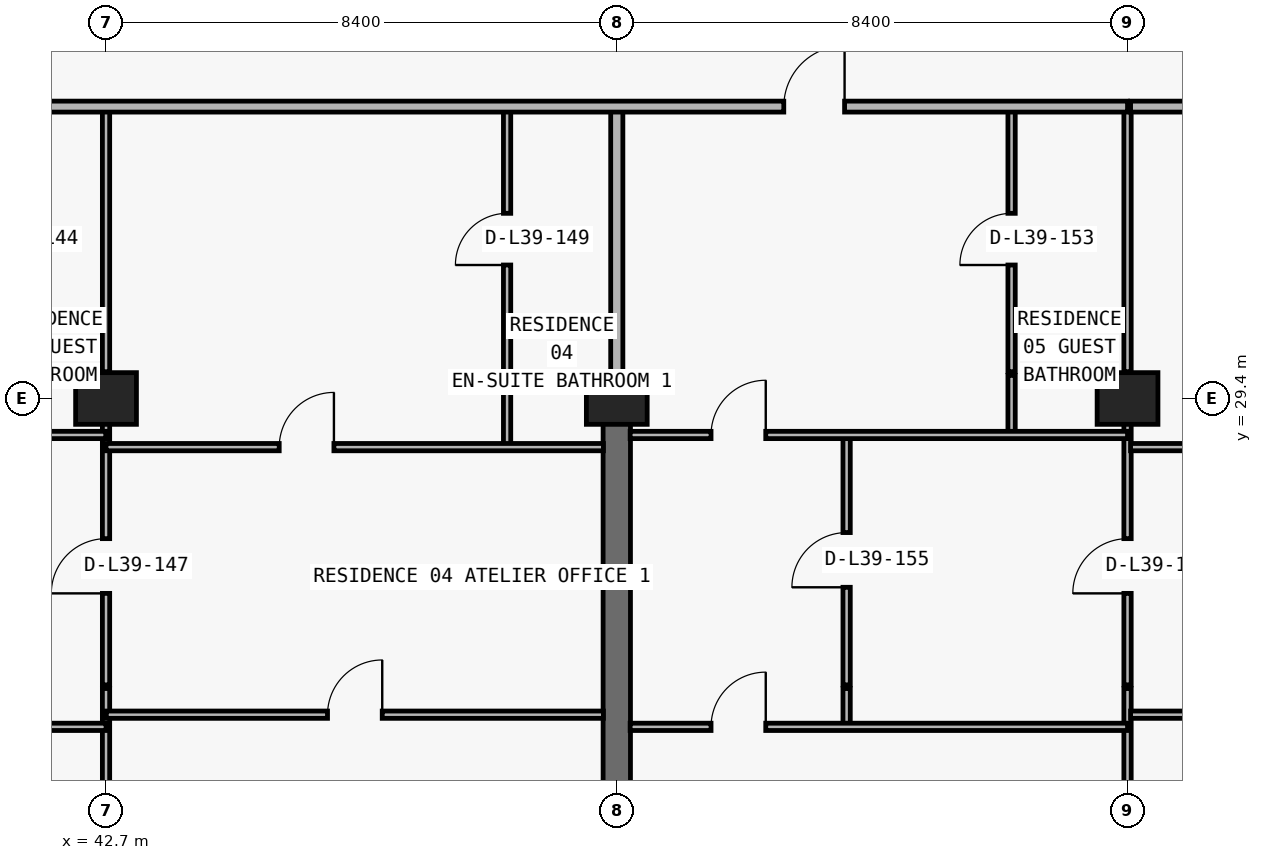
"""IFC4 building model, lengths in metres.
Left out: names, types, materials, properties, quantities, classifications, styles, units other than length and angle.
Written with IfcOpenShell. Run it as: python <this file> out.ifc"""

import sys

from ifc_helpers import new_model, si_unit, direction, frame, frame_2d, origin, origin_2d, place, context, subcontext, project, spatial, rectangle, extrude, element, fill, save


model = new_model("IFC4")
c1 = context("Model", 3, precision=1e-05, world=origin(), true_north=direction((0.0, 1.0)))
c2 = subcontext(c1, "Body", "Model", "MODEL_VIEW")
j1 = project(units=[si_unit("LENGTHUNIT", "METRE"), si_unit("PLANEANGLEUNIT", "RADIAN")], contexts=[c1])
p1 = place(None, origin())
s1 = spatial("IfcSite", under=j1, at=p1, CompositionType="ELEMENT")
p2 = place(p1, origin())
s2 = spatial("IfcBuilding", under=s1, at=p2, CompositionType="ELEMENT")
p3 = place(p2, frame((0.0, 0.0, 142.2)))
s3 = spatial("IfcBuildingStorey", under=s2, at=p3, CompositionType="ELEMENT", Elevation=142.2)
for number, where, z_axis, x_axis in (
    (1, (42.7, 29.4, 0.0), (0.0, 0.0, 1.0), (1.0, 0.0, 0.0)),
    (2, (51.1, 29.4, 0.0), (0.0, 0.0, 1.0), (1.0, 0.0, 0.0)),
    (3, (59.5, 29.4, 0.0), (0.0, 0.0, 1.0), (1.0, 0.0, 0.0)),
):
    element("IfcColumn", number, at=place(p3, frame(where, z_axis=z_axis, x_axis=x_axis)), inside=s3, PredefinedType="COLUMN", context=c2, shape_type="SweptSolid", body=[
        extrude(rectangle(XDim=1.0, YDim=0.85, at=origin_2d()), origin(), (0.0, 0.0, 1.0), 3.05),
    ])
p4 = place(p3, frame((51.1, 20.8, 0.0), z_axis=(0.0, 0.0, 1.0), x_axis=(0.0, 1.0, 0.0)))
e4 = element("IfcWall", 4, at=p4, inside=s3, PredefinedType="SHEAR", context=c2, shape_type="SweptSolid", body=[
    extrude(rectangle(XDim=8.6, YDim=0.45, at=frame_2d((4.3, 0.0))), origin(), (0.0, 0.0, 1.0), 3.05),
])
p5 = place(p3, frame((42.7, 8.84, 0.0), z_axis=(0.0, 0.0, 1.0), x_axis=(0.0, 1.0, 0.0)))
e5 = element("IfcWall", 5, at=p5, inside=s3, PredefinedType="PARTITIONING", context=c2, shape_type="SweptSolid", body=[
    extrude(rectangle(XDim=15.79, YDim=0.12, at=frame_2d((7.895, 0.0))), origin(), (0.0, 0.0, 1.0), 2.174),
])
p6 = place(p3, frame((42.7, 24.69, 0.0), z_axis=(0.0, 0.0, 1.0), x_axis=(0.0, 1.0, 0.0)))
e6 = element("IfcWall", 6, at=p6, inside=s3, PredefinedType="PARTITIONING", context=c2, shape_type="SweptSolid", body=[
    extrude(rectangle(XDim=5.09, YDim=0.12, at=frame_2d((2.545, 0.0))), origin(), (0.0, 0.0, 1.0), 2.174),
])
p7 = place(p6, frame((1.505, 0.0, 0.0)))
e7 = element("IfcOpeningElement", 7, at=p7, cuts=e6, PredefinedType="OPENING", context=c2, shape_type="SweptSolid", body=[
    extrude(rectangle(XDim=0.9, YDim=2.124, at=frame_2d((0.45, 1.062))), frame((0.0, 0.07, 0.0), z_axis=(0.0, -1.0, 0.0), x_axis=(1.0, 0.0, 0.0)), (0.0, 0.0, 1.0), 0.14),
])
p8 = place(p3, frame((42.7, 29.84, 0.0), z_axis=(0.0, 0.0, 1.0), x_axis=(0.0, 1.0, 0.0)))
e8 = element("IfcWall", 8, at=p8, inside=s3, PredefinedType="PARTITIONING", context=c2, shape_type="SweptSolid", body=[
    extrude(rectangle(XDim=4.36, YDim=0.12, at=frame_2d((2.18, 0.0))), origin(), (0.0, 0.0, 1.0), 2.174),
])
p9 = place(p3, frame((49.296, 28.6, 0.0), z_axis=(0.0, 0.0, 1.0), x_axis=(0.0, 1.0, 0.0)))
e9 = element("IfcWall", 9, at=p9, inside=s3, PredefinedType="PARTITIONING", context=c2, shape_type="SweptSolid", body=[
    extrude(rectangle(XDim=1.18, YDim=0.12, at=frame_2d((0.59, 0.0))), origin(), (0.0, 0.0, 1.0), 3.05),
])
p10 = place(p3, frame((49.296, 29.84, 0.0), z_axis=(0.0, 0.0, 1.0), x_axis=(0.0, 1.0, 0.0)))
e10 = element("IfcWall", 10, at=p10, inside=s3, PredefinedType="PARTITIONING", context=c2, shape_type="SweptSolid", body=[
    extrude(rectangle(XDim=4.36, YDim=0.12, at=frame_2d((2.18, 0.0))), origin(), (0.0, 0.0, 1.0), 3.05),
])
p11 = place(p10, frame((1.755, 0.0, 0.0)))
e11 = element("IfcOpeningElement", 11, at=p11, cuts=e10, PredefinedType="OPENING", context=c2, shape_type="SweptSolid", body=[
    extrude(rectangle(XDim=0.85, YDim=2.1, at=frame_2d((0.425, 1.05))), frame((0.0, 0.07, 0.0), z_axis=(0.0, -1.0, 0.0), x_axis=(1.0, 0.0, 0.0)), (0.0, 0.0, 1.0), 0.14),
])
p12 = place(p3, frame((51.1, 29.405, 0.0), z_axis=(0.0, 0.0, 1.0), x_axis=(0.0, 1.0, 0.0)))
e12 = element("IfcWall", 12, at=p12, inside=s3, PredefinedType="PARTITIONING", context=c2, shape_type="SweptSolid", body=[
    extrude(rectangle(XDim=0.375, YDim=0.2, at=frame_2d((0.188, 0.0))), origin(), (0.0, 0.0, 1.0), 3.05),
])
p13 = place(p3, frame((51.1, 29.84, 0.0), z_axis=(0.0, 0.0, 1.0), x_axis=(0.0, 1.0, 0.0)))
e13 = element("IfcWall", 13, at=p13, inside=s3, PredefinedType="PARTITIONING", context=c2, shape_type="SweptSolid", body=[
    extrude(rectangle(XDim=4.36, YDim=0.2, at=frame_2d((2.18, 0.0))), origin(), (0.0, 0.0, 1.0), 2.335),
])
p14 = place(p3, frame((54.88, 24.0, 0.0), z_axis=(0.0, 0.0, 1.0), x_axis=(0.0, 1.0, 0.0)))
e14 = element("IfcWall", 14, at=p14, inside=s3, PredefinedType="PARTITIONING", context=c2, shape_type="SweptSolid", body=[
    extrude(rectangle(XDim=0.63, YDim=0.12, at=frame_2d((0.315, 0.0))), origin(), (0.0, 0.0, 1.0), 3.05),
])
p15 = place(p3, frame((54.88, 24.69, 0.0), z_axis=(0.0, 0.0, 1.0), x_axis=(0.0, 1.0, 0.0)))
e15 = element("IfcWall", 15, at=p15, inside=s3, PredefinedType="PARTITIONING", context=c2, shape_type="SweptSolid", body=[
    extrude(rectangle(XDim=4.11, YDim=0.12, at=frame_2d((2.055, 0.0))), origin(), (0.0, 0.0, 1.0), 3.05),
])
p16 = place(p15, frame((1.605, 0.0, 0.0)))
e16 = element("IfcOpeningElement", 16, at=p16, cuts=e15, PredefinedType="OPENING", context=c2, shape_type="SweptSolid", body=[
    extrude(rectangle(XDim=0.9, YDim=2.15, at=frame_2d((0.45, 1.075))), frame((0.0, 0.07, 0.0), z_axis=(0.0, -1.0, 0.0), x_axis=(1.0, 0.0, 0.0)), (0.0, 0.0, 1.0), 0.14),
])
p17 = place(p3, frame((57.593, 28.8, 0.0), z_axis=(0.0, 0.0, 1.0), x_axis=(0.0, 1.0, 0.0)))
e17 = element("IfcWall", 17, at=p17, inside=s3, PredefinedType="PARTITIONING", context=c2, shape_type="SweptSolid", body=[
    extrude(rectangle(XDim=0.98, YDim=0.12, at=frame_2d((0.49, 0.0))), origin(), (0.0, 0.0, 1.0), 3.05),
])
p18 = place(p3, frame((57.593, 29.84, 0.0), z_axis=(0.0, 0.0, 1.0), x_axis=(0.0, 1.0, 0.0)))
e18 = element("IfcWall", 18, at=p18, inside=s3, PredefinedType="PARTITIONING", context=c2, shape_type="SweptSolid", body=[
    extrude(rectangle(XDim=4.36, YDim=0.12, at=frame_2d((2.18, 0.0))), origin(), (0.0, 0.0, 1.0), 3.05),
])
p19 = place(p18, frame((1.755, 0.0, 0.0)))
e19 = element("IfcOpeningElement", 19, at=p19, cuts=e18, PredefinedType="OPENING", context=c2, shape_type="SweptSolid", body=[
    extrude(rectangle(XDim=0.85, YDim=2.1, at=frame_2d((0.425, 1.05))), frame((0.0, 0.07, 0.0), z_axis=(0.0, -1.0, 0.0), x_axis=(1.0, 0.0, 0.0)), (0.0, 0.0, 1.0), 0.14),
])
p20 = place(p3, frame((59.5, 8.84, 0.0), z_axis=(0.0, 0.0, 1.0), x_axis=(0.0, 1.0, 0.0)))
e20 = element("IfcWall", 20, at=p20, inside=s3, PredefinedType="PARTITIONING", context=c2, shape_type="SweptSolid", body=[
    extrude(rectangle(XDim=15.79, YDim=0.12, at=frame_2d((7.895, 0.0))), origin(), (0.0, 0.0, 1.0), 2.174),
])
p21 = place(p3, frame((59.5, 24.69, 0.0), z_axis=(0.0, 0.0, 1.0), x_axis=(0.0, 1.0, 0.0)))
e21 = element("IfcWall", 21, at=p21, inside=s3, PredefinedType="PARTITIONING", context=c2, shape_type="SweptSolid", body=[
    extrude(rectangle(XDim=5.09, YDim=0.12, at=frame_2d((2.545, 0.0))), origin(), (0.0, 0.0, 1.0), 2.174),
])
p22 = place(p21, frame((1.505, 0.0, 0.0)))
e22 = element("IfcOpeningElement", 22, at=p22, cuts=e21, PredefinedType="OPENING", context=c2, shape_type="SweptSolid", body=[
    extrude(rectangle(XDim=0.9, YDim=2.124, at=frame_2d((0.45, 1.062))), frame((0.0, 0.07, 0.0), z_axis=(0.0, -1.0, 0.0), x_axis=(1.0, 0.0, 0.0)), (0.0, 0.0, 1.0), 0.14),
])
p23 = place(p3, frame((59.5, 29.84, 0.0), z_axis=(0.0, 0.0, 1.0), x_axis=(0.0, 1.0, 0.0)))
e23 = element("IfcWall", 23, at=p23, inside=s3, PredefinedType="PARTITIONING", context=c2, shape_type="SweptSolid", body=[
    extrude(rectangle(XDim=4.36, YDim=0.12, at=frame_2d((2.18, 0.0))), origin(), (0.0, 0.0, 1.0), 2.174),
])
p24 = place(p3, frame((35.1, 24.0, 0.0), z_axis=(0.0, 0.0, 1.0), x_axis=(1.0, 0.0, 0.0)))
e24 = element("IfcWall", 24, at=p24, inside=s3, PredefinedType="PARTITIONING", context=c2, shape_type="SweptSolid", body=[
    extrude(rectangle(XDim=7.6, YDim=0.12, at=frame_2d((3.8, 0.0))), origin(), (0.0, 0.0, 1.0), 3.05),
])
p25 = place(p24, frame((3.35, 0.0, 0.0)))
e25 = element("IfcOpeningElement", 25, at=p25, cuts=e24, PredefinedType="OPENING", context=c2, shape_type="SweptSolid", body=[
    extrude(rectangle(XDim=0.9, YDim=2.15, at=frame_2d((0.45, 1.075))), frame((0.0, 0.07, 0.0), z_axis=(0.0, -1.0, 0.0), x_axis=(1.0, 0.0, 0.0)), (0.0, 0.0, 1.0), 0.14),
])
p26 = place(p3, frame((51.32, 24.0, 0.0), z_axis=(0.0, 0.0, 1.0), x_axis=(1.0, 0.0, 0.0)))
e26 = element("IfcWall", 26, at=p26, inside=s3, PredefinedType="PARTITIONING", context=c2, shape_type="SweptSolid", body=[
    extrude(rectangle(XDim=8.18, YDim=0.12, at=frame_2d((4.09, 0.0))), origin(), (0.0, 0.0, 1.0), 3.05),
])
p27 = place(p26, frame((1.33, 0.0, 0.0)))
e27 = element("IfcOpeningElement", 27, at=p27, cuts=e26, PredefinedType="OPENING", context=c2, shape_type="SweptSolid", body=[
    extrude(rectangle(XDim=0.9, YDim=2.15, at=frame_2d((0.45, 1.075))), frame((0.0, 0.07, 0.0), z_axis=(0.0, -1.0, 0.0), x_axis=(1.0, 0.0, 0.0)), (0.0, 0.0, 1.0), 0.14),
])
p28 = place(p3, frame((42.705, 24.2, 0.0), z_axis=(0.0, 0.0, 1.0), x_axis=(1.0, 0.0, 0.0)))
e28 = element("IfcWall", 28, at=p28, inside=s3, PredefinedType="PARTITIONING", context=c2, shape_type="SweptSolid", body=[
    extrude(rectangle(XDim=8.175, YDim=0.12, at=frame_2d((4.087, 0.0))), origin(), (0.0, 0.0, 1.0), 3.05),
])
p29 = place(p28, frame((3.637, 0.0, 0.0)))
e29 = element("IfcOpeningElement", 29, at=p29, cuts=e28, PredefinedType="OPENING", context=c2, shape_type="SweptSolid", body=[
    extrude(rectangle(XDim=0.9, YDim=2.15, at=frame_2d((0.45, 1.075))), frame((0.0, 0.07, 0.0), z_axis=(0.0, -1.0, 0.0), x_axis=(1.0, 0.0, 0.0)), (0.0, 0.0, 1.0), 0.14),
])
p30 = place(p3, frame((59.55, 24.2, 0.0), z_axis=(0.0, 0.0, 1.0), x_axis=(1.0, 0.0, 0.0)))
e30 = element("IfcWall", 30, at=p30, inside=s3, PredefinedType="PARTITIONING", context=c2, shape_type="SweptSolid", body=[
    extrude(rectangle(XDim=8.35, YDim=0.12, at=frame_2d((4.175, 0.0))), origin(), (0.0, 0.0, 1.0), 3.05),
])
p31 = place(p30, frame((3.725, 0.0, 0.0)))
e31 = element("IfcOpeningElement", 31, at=p31, cuts=e30, PredefinedType="OPENING", context=c2, shape_type="SweptSolid", body=[
    extrude(rectangle(XDim=0.9, YDim=2.15, at=frame_2d((0.45, 1.075))), frame((0.0, 0.07, 0.0), z_axis=(0.0, -1.0, 0.0), x_axis=(1.0, 0.0, 0.0)), (0.0, 0.0, 1.0), 0.14),
])
p32 = place(p3, frame((42.7, 28.6, 0.0), z_axis=(0.0, 0.0, 1.0), x_axis=(1.0, 0.0, 0.0)))
e32 = element("IfcWall", 32, at=p32, inside=s3, PredefinedType="PARTITIONING", context=c2, shape_type="SweptSolid", body=[
    extrude(rectangle(XDim=8.18, YDim=0.12, at=frame_2d((4.09, 0.0))), origin(), (0.0, 0.0, 1.0), 3.05),
])
p33 = place(p32, frame((2.848, 0.0, 0.0)))
e33 = element("IfcOpeningElement", 33, at=p33, cuts=e32, PredefinedType="OPENING", context=c2, shape_type="SweptSolid", body=[
    extrude(rectangle(XDim=0.9, YDim=2.15, at=frame_2d((0.45, 1.075))), frame((0.0, 0.07, 0.0), z_axis=(0.0, -1.0, 0.0), x_axis=(1.0, 0.0, 0.0)), (0.0, 0.0, 1.0), 0.14),
])
p34 = place(p3, frame((59.55, 28.6, 0.0), z_axis=(0.0, 0.0, 1.0), x_axis=(1.0, 0.0, 0.0)))
e34 = element("IfcWall", 34, at=p34, inside=s3, PredefinedType="PARTITIONING", context=c2, shape_type="SweptSolid", body=[
    extrude(rectangle(XDim=8.35, YDim=0.12, at=frame_2d((4.175, 0.0))), origin(), (0.0, 0.0, 1.0), 3.05),
])
p35 = place(p34, frame((2.868, 0.0, 0.0)))
e35 = element("IfcOpeningElement", 35, at=p35, cuts=e34, PredefinedType="OPENING", context=c2, shape_type="SweptSolid", body=[
    extrude(rectangle(XDim=0.9, YDim=2.15, at=frame_2d((0.45, 1.075))), frame((0.0, 0.07, 0.0), z_axis=(0.0, -1.0, 0.0), x_axis=(1.0, 0.0, 0.0)), (0.0, 0.0, 1.0), 0.14),
])
p36 = place(p3, frame((35.1, 28.8, 0.0), z_axis=(0.0, 0.0, 1.0), x_axis=(1.0, 0.0, 0.0)))
e36 = element("IfcWall", 36, at=p36, inside=s3, PredefinedType="PARTITIONING", context=c2, shape_type="SweptSolid", body=[
    extrude(rectangle(XDim=7.595, YDim=0.12, at=frame_2d((3.797, 0.0))), origin(), (0.0, 0.0, 1.0), 3.05),
])
p37 = place(p36, frame((2.442, 0.0, 0.0)))
e37 = element("IfcOpeningElement", 37, at=p37, cuts=e36, PredefinedType="OPENING", context=c2, shape_type="SweptSolid", body=[
    extrude(rectangle(XDim=0.9, YDim=2.15, at=frame_2d((0.45, 1.075))), frame((0.0, 0.07, 0.0), z_axis=(0.0, -1.0, 0.0), x_axis=(1.0, 0.0, 0.0)), (0.0, 0.0, 1.0), 0.14),
])
p38 = place(p3, frame((51.32, 28.8, 0.0), z_axis=(0.0, 0.0, 1.0), x_axis=(1.0, 0.0, 0.0)))
e38 = element("IfcWall", 38, at=p38, inside=s3, PredefinedType="PARTITIONING", context=c2, shape_type="SweptSolid", body=[
    extrude(rectangle(XDim=8.18, YDim=0.12, at=frame_2d((4.09, 0.0))), origin(), (0.0, 0.0, 1.0), 3.05),
])
p39 = place(p38, frame((1.33, 0.0, 0.0)))
e39 = element("IfcOpeningElement", 39, at=p39, cuts=e38, PredefinedType="OPENING", context=c2, shape_type="SweptSolid", body=[
    extrude(rectangle(XDim=0.9, YDim=2.15, at=frame_2d((0.45, 1.075))), frame((0.0, 0.07, 0.0), z_axis=(0.0, -1.0, 0.0), x_axis=(1.0, 0.0, 0.0)), (0.0, 0.0, 1.0), 0.14),
])
p40 = place(p3, frame((18.3, 34.2, 0.0), z_axis=(0.0, 0.0, 1.0), x_axis=(1.0, 0.0, 0.0)))
e40 = element("IfcWall", 40, at=p40, inside=s3, PredefinedType="PARTITIONING", context=c2, shape_type="SweptSolid", body=[
    extrude(rectangle(XDim=41.2, YDim=0.18, at=frame_2d((20.6, 0.0))), origin(), (0.0, 0.0, 1.0), 3.05),
])
p41 = place(p40, frame((2.683, 0.0, 0.0)))
e41 = element("IfcOpeningElement", 41, at=p41, cuts=e40, PredefinedType="OPENING", context=c2, shape_type="SweptSolid", body=[
    extrude(rectangle(XDim=1.0, YDim=2.2, at=frame_2d((0.5, 1.1))), frame((0.0, 0.1, 0.0), z_axis=(0.0, -1.0, 0.0), x_axis=(1.0, 0.0, 0.0)), (0.0, 0.0, 1.0), 0.2),
])
p42 = place(p40, frame((10.919, 0.0, 0.0)))
e42 = element("IfcOpeningElement", 42, at=p42, cuts=e40, PredefinedType="OPENING", context=c2, shape_type="SweptSolid", body=[
    extrude(rectangle(XDim=1.0, YDim=2.2, at=frame_2d((0.5, 1.1))), frame((0.0, 0.1, 0.0), z_axis=(0.0, -1.0, 0.0), x_axis=(1.0, 0.0, 0.0)), (0.0, 0.0, 1.0), 0.2),
])
p43 = place(p40, frame((19.192, 0.0, 0.0)))
e43 = element("IfcOpeningElement", 43, at=p43, cuts=e40, PredefinedType="OPENING", context=c2, shape_type="SweptSolid", body=[
    extrude(rectangle(XDim=1.0, YDim=2.2, at=frame_2d((0.5, 1.1))), frame((0.0, 0.1, 0.0), z_axis=(0.0, -1.0, 0.0), x_axis=(1.0, 0.0, 0.0)), (0.0, 0.0, 1.0), 0.2),
])
p44 = place(p40, frame((35.546, 0.0, 0.0)))
e44 = element("IfcOpeningElement", 44, at=p44, cuts=e40, PredefinedType="OPENING", context=c2, shape_type="SweptSolid", body=[
    extrude(rectangle(XDim=1.0, YDim=2.2, at=frame_2d((0.5, 1.1))), frame((0.0, 0.1, 0.0), z_axis=(0.0, -1.0, 0.0), x_axis=(1.0, 0.0, 0.0)), (0.0, 0.0, 1.0), 0.2),
])
p45 = place(p3, frame((59.55, 34.2, 0.0), z_axis=(0.0, 0.0, 1.0), x_axis=(1.0, 0.0, 0.0)))
e45 = element("IfcWall", 45, at=p45, inside=s3, PredefinedType="PARTITIONING", context=c2, shape_type="SweptSolid", body=[
    extrude(rectangle(XDim=10.55, YDim=0.18, at=frame_2d((5.275, 0.0))), origin(), (0.0, 0.0, 1.0), 3.05),
])
p46 = place(p7, origin())
e46 = element("IfcDoor", 46, at=p46, inside=s3, OperationType="SINGLE_SWING_LEFT", PredefinedType="DOOR", context=c2, shape_type="SweptSolid", body=[
    extrude(rectangle(XDim=0.9, YDim=2.124, at=frame_2d((0.45, 1.062))), frame((0.0, 0.025, 0.0), z_axis=(0.0, -1.0, 0.0), x_axis=(1.0, 0.0, 0.0)), (0.0, 0.0, 1.0), 0.05),
])
fill(e7, e46)
p47 = place(p33, origin())
e47 = element("IfcDoor", 47, at=p47, inside=s3, OperationType="SINGLE_SWING_RIGHT", PredefinedType="DOOR", context=c2, shape_type="SweptSolid", body=[
    extrude(rectangle(XDim=0.9, YDim=2.15, at=frame_2d((0.45, 1.075))), frame((0.0, 0.025, 0.0), z_axis=(0.0, -1.0, 0.0), x_axis=(1.0, 0.0, 0.0)), (0.0, 0.0, 1.0), 0.05),
])
fill(e33, e47)
p48 = place(p11, origin())
e48 = element("IfcDoor", 48, at=p48, inside=s3, OperationType="SINGLE_SWING_LEFT", PredefinedType="DOOR", context=c2, shape_type="SweptSolid", body=[
    extrude(rectangle(XDim=0.85, YDim=2.1, at=frame_2d((0.425, 1.05))), frame((0.0, 0.025, 0.0), z_axis=(0.0, -1.0, 0.0), x_axis=(1.0, 0.0, 0.0)), (0.0, 0.0, 1.0), 0.05),
])
fill(e11, e48)
p49 = place(p29, origin())
e49 = element("IfcDoor", 49, at=p49, inside=s3, OperationType="SINGLE_SWING_RIGHT", PredefinedType="DOOR", context=c2, shape_type="SweptSolid", body=[
    extrude(rectangle(XDim=0.9, YDim=2.15, at=frame_2d((0.45, 1.075))), frame((0.0, 0.025, 0.0), z_axis=(0.0, -1.0, 0.0), x_axis=(1.0, 0.0, 0.0)), (0.0, 0.0, 1.0), 0.05),
])
fill(e29, e49)
p50 = place(p44, origin())
e50 = element("IfcDoor", 50, at=p50, inside=s3, OperationType="SINGLE_SWING_RIGHT", PredefinedType="DOOR", context=c2, shape_type="SweptSolid", body=[
    extrude(rectangle(XDim=1.0, YDim=2.2, at=frame_2d((0.5, 1.1))), frame((0.0, 0.025, 0.0), z_axis=(0.0, -1.0, 0.0), x_axis=(1.0, 0.0, 0.0)), (0.0, 0.0, 1.0), 0.05),
])
fill(e44, e50)
p51 = place(p19, origin())
e51 = element("IfcDoor", 51, at=p51, inside=s3, OperationType="SINGLE_SWING_LEFT", PredefinedType="DOOR", context=c2, shape_type="SweptSolid", body=[
    extrude(rectangle(XDim=0.85, YDim=2.1, at=frame_2d((0.425, 1.05))), frame((0.0, 0.025, 0.0), z_axis=(0.0, -1.0, 0.0), x_axis=(1.0, 0.0, 0.0)), (0.0, 0.0, 1.0), 0.05),
])
fill(e19, e51)
p52 = place(p39, origin())
e52 = element("IfcDoor", 52, at=p52, inside=s3, OperationType="SINGLE_SWING_RIGHT", PredefinedType="DOOR", context=c2, shape_type="SweptSolid", body=[
    extrude(rectangle(XDim=0.9, YDim=2.15, at=frame_2d((0.45, 1.075))), frame((0.0, 0.025, 0.0), z_axis=(0.0, -1.0, 0.0), x_axis=(1.0, 0.0, 0.0)), (0.0, 0.0, 1.0), 0.05),
])
fill(e39, e52)
p53 = place(p16, origin())
e53 = element("IfcDoor", 53, at=p53, inside=s3, OperationType="SINGLE_SWING_LEFT", PredefinedType="DOOR", context=c2, shape_type="SweptSolid", body=[
    extrude(rectangle(XDim=0.9, YDim=2.15, at=frame_2d((0.45, 1.075))), frame((0.0, 0.025, 0.0), z_axis=(0.0, -1.0, 0.0), x_axis=(1.0, 0.0, 0.0)), (0.0, 0.0, 1.0), 0.05),
])
fill(e16, e53)
p54 = place(p27, origin())
e54 = element("IfcDoor", 54, at=p54, inside=s3, OperationType="SINGLE_SWING_RIGHT", PredefinedType="DOOR", context=c2, shape_type="SweptSolid", body=[
    extrude(rectangle(XDim=0.9, YDim=2.15, at=frame_2d((0.45, 1.075))), frame((0.0, 0.025, 0.0), z_axis=(0.0, -1.0, 0.0), x_axis=(1.0, 0.0, 0.0)), (0.0, 0.0, 1.0), 0.05),
])
fill(e27, e54)
p55 = place(p22, origin())
e55 = element("IfcDoor", 55, at=p55, inside=s3, OperationType="SINGLE_SWING_LEFT", PredefinedType="DOOR", context=c2, shape_type="SweptSolid", body=[
    extrude(rectangle(XDim=0.9, YDim=2.124, at=frame_2d((0.45, 1.062))), frame((0.0, 0.025, 0.0), z_axis=(0.0, -1.0, 0.0), x_axis=(1.0, 0.0, 0.0)), (0.0, 0.0, 1.0), 0.05),
])
fill(e22, e55)
save(model, sys.argv[1])
